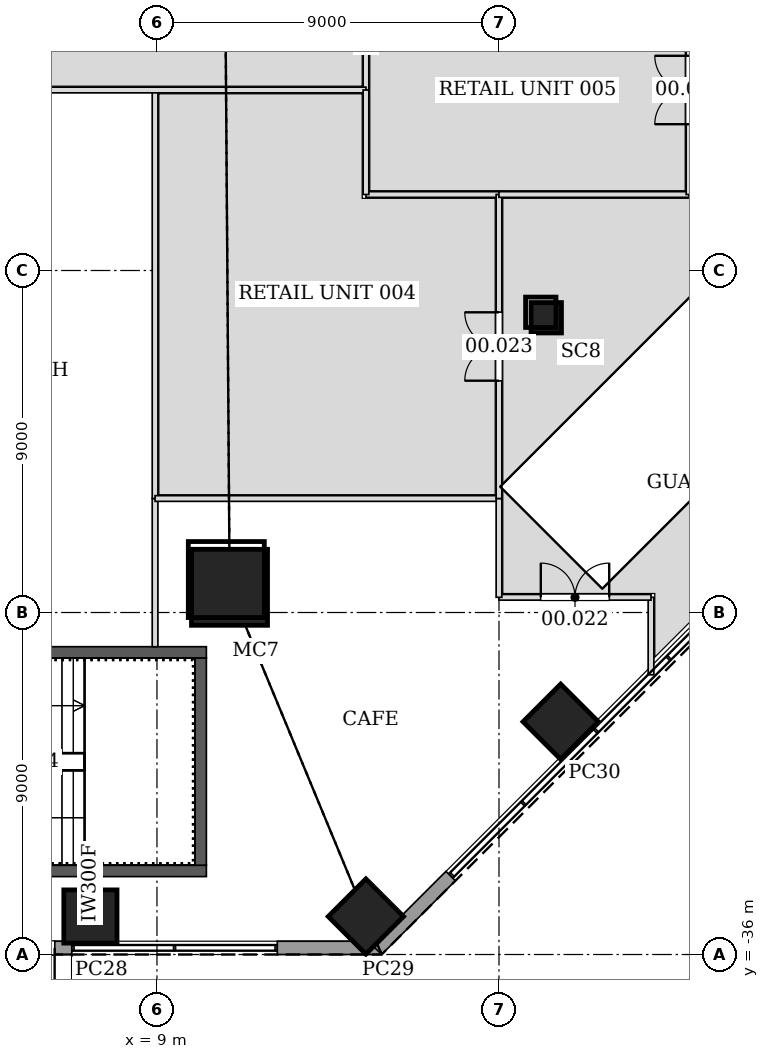
"""IFC4 building model, lengths in metres.
Left out: names, types, materials, properties, quantities, classifications, styles, units other than length and angle.
Written with IfcOpenShell. Run it as: python <this file> out.ifc"""

import sys

from ifc_helpers import new_model, si_unit, direction, frame, frame_2d, origin, origin_2d, place, context, subcontext, project, spatial, rectangle, hollow_rectangle, extrude, element, fill, save


model = new_model("IFC4")
c1 = context("Model", 3, precision=1e-05, world=origin(), true_north=direction((0.0, 1.0)))
c2 = subcontext(c1, "Body", "Model", "MODEL_VIEW")
j1 = project(units=[si_unit("LENGTHUNIT", "METRE"), si_unit("PLANEANGLEUNIT", "RADIAN")], contexts=[c1])
p1 = place(None, origin())
s1 = spatial("IfcSite", under=j1, at=p1, CompositionType="ELEMENT")
p2 = place(p1, origin())
s2 = spatial("IfcBuilding", under=s1, at=p2, CompositionType="ELEMENT")
p3 = place(p2, origin())
s3 = spatial("IfcBuildingStorey", under=s2, at=p3, CompositionType="ELEMENT", Elevation=0.0)
p4 = place(p3, frame((10.909, -26.336, 0.0), z_axis=(-0.011726897842, 0.028266568786, 0.999531630793), x_axis=(-0.923665637433, -0.383199413132, 0.0)))
e1 = element("IfcColumn", 1, at=p4, inside=s3, PredefinedType="COLUMN", context=c2, shape_type="SweptSolid", body=[
    extrude(hollow_rectangle(XDim=2.0, YDim=2.0, WallThickness=0.09, at=origin_2d()), origin(), (0.0, 0.0, 1.0), 7.203),
])
p5 = place(p3, frame((19.244, -19.244, 0.0), z_axis=(-0.019998101035, 0.019998101035, 0.999599995953), x_axis=(-0.707106781187, -0.707106781187, 0.0)))
e2 = element("IfcColumn", 2, at=p5, inside=s3, PredefinedType="COLUMN", context=c2, shape_type="SweptSolid", body=[
    extrude(hollow_rectangle(XDim=0.8, YDim=0.8, WallThickness=0.05, at=origin_2d()), origin(), (0.0, 0.0, 1.0), 7.203),
])
for number, where, z_axis, x_axis in (
    (3, (7.249, -35.0, 0.0), (0.0, 0.0, 1.0), (1.0, 0.0, 0.0)),
    (4, (14.498, -35.0, 0.0), (0.0, 0.0, 1.0), (0.707, 0.707, 0.0)),
    (5, (19.623, -29.874, 0.0), (0.0, 0.0, 1.0), (0.707, 0.707, 0.0)),
):
    element("IfcColumn", number, at=place(p3, frame(where, z_axis=z_axis, x_axis=x_axis)), inside=s3, PredefinedType="COLUMN", context=c2, shape_type="SweptSolid", body=[
        extrude(rectangle(XDim=1.4, YDim=1.4, at=origin_2d()), origin(), (0.0, 0.0, 1.0), 7.2),
    ])
p6 = place(p3, frame((0.1, -33.8, 0.0), z_axis=(0.0, 0.0, 1.0), x_axis=(1.0, 0.0, 0.0)))
e6 = element("IfcWall", 6, at=p6, inside=s3, PredefinedType="SOLIDWALL", context=c2, shape_type="SweptSolid", body=[
    extrude(rectangle(XDim=10.2, YDim=0.3, at=frame_2d((5.1, 0.0))), origin(), (0.0, 0.0, 1.0), 7.2),
])
p7 = place(p6, frame((1.05, 0.0, 0.0)))
e7 = element("IfcOpeningElement", 7, at=p7, cuts=e6, PredefinedType="OPENING", context=c2, shape_type="SweptSolid", body=[
    extrude(rectangle(XDim=1.0, YDim=2.1, at=frame_2d((0.5, 1.05))), frame((0.0, 0.16, 0.0), z_axis=(0.0, -1.0, 0.0), x_axis=(1.0, 0.0, 0.0)), (0.0, 0.0, 1.0), 0.32),
])
p8 = place(p3, frame((10.3, -28.05, 0.0), z_axis=(0.0, 0.0, 1.0), x_axis=(-1.0, 0.0, 0.0)))
e8 = element("IfcWall", 8, at=p8, inside=s3, PredefinedType="SOLIDWALL", context=c2, shape_type="SweptSolid", body=[
    extrude(rectangle(XDim=10.2, YDim=0.3, at=frame_2d((5.1, 0.0))), origin(), (0.0, 0.0, 1.0), 7.2),
])
p9 = place(p3, frame((10.15, -33.65, 0.0), z_axis=(0.0, 0.0, 1.0), x_axis=(0.0, 1.0, 0.0)))
e9 = element("IfcWall", 9, at=p9, inside=s3, PredefinedType="SOLIDWALL", context=c2, shape_type="SweptSolid", body=[
    extrude(rectangle(XDim=5.45, YDim=0.3, at=frame_2d((2.725, 0.0))), origin(), (0.0, 0.0, 1.0), 7.2),
])
p10 = place(p3, frame((4.055, -35.825, 0.0), z_axis=(0.0, 0.0, 1.0), x_axis=(1.0, 0.0, 0.0)))
e10 = element("IfcWall", 10, at=p10, inside=s3, PredefinedType="SOLIDWALL", context=c2, shape_type="SweptSolid", body=[
    extrude(rectangle(XDim=2.704, YDim=0.35, at=frame_2d((1.352, 0.0))), origin(), (0.0, 0.0, 1.0), 6.9),
])
p11 = place(p10, frame((0.452, 0.0, 0.0)))
e11 = element("IfcOpeningElement", 11, at=p11, cuts=e10, PredefinedType="OPENING", context=c2, shape_type="SweptSolid", body=[
    extrude(rectangle(XDim=1.8, YDim=2.4, at=frame_2d((0.9, 1.2))), frame((0.0, 0.185, 0.0), z_axis=(0.0, -1.0, 0.0), x_axis=(1.0, 0.0, 0.0)), (0.0, 0.0, 1.0), 0.37),
])
for number, where, z_axis, x_axis in (
    (12, (12.167, -35.825, 0.0), (0.0, 0.0, 1.0), (1.0, 0.0, 0.0)),
    (13, (14.788, -35.876, 0.0), (0.0, 0.0, 1.0), (0.707, 0.707, 0.0)),
):
    element("IfcWall", number, at=place(p3, frame(where, z_axis=z_axis, x_axis=x_axis)), inside=s3, PredefinedType="SOLIDWALL", context=c2, shape_type="SweptSolid", body=[
        extrude(rectangle(XDim=2.745, YDim=0.35, at=frame_2d((1.373, 0.0))), origin(), (0.0, 0.0, 1.0), 6.9),
    ])
p12 = place(p3, frame((7.249, -34.281, 0.0), z_axis=(0.0, 0.0, 1.0), x_axis=(0.0, 1.0, 0.0)))
e14 = element("IfcWall", 14, at=p12, inside=s3, PredefinedType="PARTITIONING", context=c2, shape_type="SweptSolid", body=[
    extrude(rectangle(XDim=0.332, YDim=0.3, at=frame_2d((0.166, 0.0))), origin(), (0.0, 0.0, 1.0), 6.291),
])
p13 = place(p3, frame((14.5, -8.0, 0.0), z_axis=(0.0, 0.0, 1.0), x_axis=(0.0, -1.0, 0.0)))
e15 = element("IfcWall", 15, at=p13, inside=s3, PredefinedType="PARTITIONING", context=c2, shape_type="SweptSolid", body=[
    extrude(rectangle(XDim=5.251, YDim=0.15, at=frame_2d((2.625, 0.0))), origin(), (0.0, 0.0, 1.0), 5.59),
])
p14 = place(p13, frame((0.8, 0.0, 0.0)))
e16 = element("IfcOpeningElement", 16, at=p14, cuts=e15, PredefinedType="OPENING", context=c2, shape_type="SweptSolid", body=[
    extrude(rectangle(XDim=0.9, YDim=2.1, at=frame_2d((0.45, 1.05))), frame((0.0, 0.085, 0.0), z_axis=(0.0, -1.0, 0.0), x_axis=(1.0, 0.0, 0.0)), (0.0, 0.0, 1.0), 0.17),
])
p15 = place(p3, frame((8.95, -27.9, 0.0), z_axis=(0.0, 0.0, 1.0), x_axis=(0.0, 1.0, 0.0)))
e17 = element("IfcWall", 17, at=p15, inside=s3, PredefinedType="PARTITIONING", context=c2, shape_type="SweptSolid", body=[
    extrude(rectangle(XDim=3.901, YDim=0.15, at=frame_2d((1.951, 0.0))), origin(), (0.0, 0.0, 1.0), 5.879),
])
p16 = place(p3, frame((8.95, -24.001, 0.0), z_axis=(0.0, 0.0, 1.0), x_axis=(0.0, 1.0, 0.0)))
e18 = element("IfcWall", 18, at=p16, inside=s3, PredefinedType="PARTITIONING", context=c2, shape_type="SweptSolid", body=[
    extrude(rectangle(XDim=10.751, YDim=0.15, at=frame_2d((5.375, 0.0))), origin(), (0.0, 0.0, 1.0), 6.044),
])
p17 = place(p3, frame((0.25, -13.25, 0.0), z_axis=(0.0, 0.0, 1.0), x_axis=(1.0, 0.0, 0.0)))
e19 = element("IfcWall", 19, at=p17, inside=s3, PredefinedType="PARTITIONING", context=c2, shape_type="SweptSolid", body=[
    extrude(rectangle(XDim=14.25, YDim=0.15, at=frame_2d((7.125, 0.0))), origin(), (0.0, 0.0, 1.0), 5.59),
])
p18 = place(p17, frame((3.45, 0.0, 0.0)))
e20 = element("IfcOpeningElement", 20, at=p18, cuts=e19, PredefinedType="OPENING", context=c2, shape_type="SweptSolid", body=[
    extrude(rectangle(XDim=1.8, YDim=2.4, at=frame_2d((0.9, 1.2))), frame((0.0, 0.085, 0.0), z_axis=(0.0, -1.0, 0.0), x_axis=(1.0, 0.0, 0.0)), (0.0, 0.0, 1.0), 0.17),
])
p19 = place(p3, frame((18.0, -24.0, 0.0), z_axis=(0.0, 0.0, 1.0), x_axis=(-1.0, 0.0, 0.0)))
e21 = element("IfcWall", 21, at=p19, inside=s3, PredefinedType="PARTITIONING", context=c2, shape_type="SweptSolid", body=[
    extrude(rectangle(XDim=9.05, YDim=0.15, at=frame_2d((4.525, 0.0))), origin(), (0.0, 0.0, 1.0), 5.59),
])
p20 = place(p3, frame((22.0, -28.64, 0.0), z_axis=(0.0, 0.0, 1.0), x_axis=(0.0, 1.0, 0.0)))
e22 = element("IfcWall", 22, at=p20, inside=s3, PredefinedType="PARTITIONING", context=c2, shape_type="SweptSolid", body=[
    extrude(rectangle(XDim=2.04, YDim=0.15, at=frame_2d((1.02, 0.0))), origin(), (0.0, 0.0, 1.0), 6.291),
])
p21 = place(p3, frame((22.0, -26.6, 0.0), z_axis=(0.0, 0.0, 1.0), x_axis=(-1.0, 0.0, 0.0)))
e23 = element("IfcWall", 23, at=p21, inside=s3, PredefinedType="PARTITIONING", context=c2, shape_type="SweptSolid", body=[
    extrude(rectangle(XDim=4.0, YDim=0.15, at=frame_2d((2.0, 0.0))), origin(), (0.0, 0.0, 1.0), 6.364),
])
p22 = place(p21, frame((1.1, 0.0, 0.0)))
e24 = element("IfcOpeningElement", 24, at=p22, cuts=e23, PredefinedType="OPENING", context=c2, shape_type="SweptSolid", body=[
    extrude(rectangle(XDim=1.8, YDim=2.4, at=frame_2d((0.9, 1.2))), frame((0.0, 0.085, 0.0), z_axis=(0.0, -1.0, 0.0), x_axis=(1.0, 0.0, 0.0)), (0.0, 0.0, 1.0), 0.17),
])
p23 = place(p3, frame((18.0, -26.6, 0.0), z_axis=(0.0, 0.0, 1.0), x_axis=(0.0, 1.0, 0.0)))
e25 = element("IfcWall", 25, at=p23, inside=s3, PredefinedType="PARTITIONING", context=c2, shape_type="SweptSolid", body=[
    extrude(rectangle(XDim=2.6, YDim=0.15, at=frame_2d((1.3, 0.0))), origin(), (0.0, 0.0, 1.0), 6.9),
])
p24 = place(p3, frame((18.0, -16.0, 0.0), z_axis=(0.0, 0.0, 1.0), x_axis=(-1.0, 0.0, 0.0)))
e26 = element("IfcWall", 26, at=p24, inside=s3, PredefinedType="PARTITIONING", context=c2, shape_type="SweptSolid", body=[
    extrude(rectangle(XDim=3.5, YDim=0.15, at=frame_2d((1.75, 0.0))), origin(), (0.0, 0.0, 1.0), 5.79),
])
p25 = place(p3, frame((14.5, -16.0, 0.0), z_axis=(0.0, 0.0, 1.0), x_axis=(0.0, 1.0, 0.0)))
e27 = element("IfcWall", 27, at=p25, inside=s3, PredefinedType="PARTITIONING", context=c2, shape_type="SweptSolid", body=[
    extrude(rectangle(XDim=2.75, YDim=0.15, at=frame_2d((1.375, 0.0))), origin(), (0.0, 0.0, 1.0), 5.79),
])
p26 = place(p3, frame((18.0, -24.0, 0.0), z_axis=(0.0, 0.0, 1.0), x_axis=(0.0, 1.0, 0.0)))
e28 = element("IfcWall", 28, at=p26, inside=s3, PredefinedType="PARTITIONING", context=c2, shape_type="SweptSolid", body=[
    extrude(rectangle(XDim=8.0, YDim=0.15, at=frame_2d((4.0, 0.0))), origin(), (0.0, 0.0, 1.0), 5.79),
])
p27 = place(p26, frame((3.1, 0.0, 0.0)))
e29 = element("IfcOpeningElement", 29, at=p27, cuts=e28, PredefinedType="OPENING", context=c2, shape_type="SweptSolid", body=[
    extrude(rectangle(XDim=1.8, YDim=2.4, at=frame_2d((0.9, 1.2))), frame((0.0, 0.085, 0.0), z_axis=(0.0, -1.0, 0.0), x_axis=(1.0, 0.0, 0.0)), (0.0, 0.0, 1.0), 0.17),
])
p28 = place(p3, frame((17.999, -16.0, 0.0), z_axis=(0.0, 0.0, 1.0), x_axis=(1.0, 0.0, 0.0)))
e30 = element("IfcWall", 30, at=p28, inside=s3, PredefinedType="PARTITIONING", context=c2, shape_type="SweptSolid", body=[
    extrude(rectangle(XDim=5.001, YDim=0.15, at=frame_2d((2.5, 0.0))), origin(), (0.0, 0.0, 1.0), 6.049),
])
p29 = place(p3, frame((23.0, -16.0, 0.0), z_axis=(0.0, 0.0, 1.0), x_axis=(0.0, 1.0, 0.0)))
e31 = element("IfcWall", 31, at=p29, inside=s3, PredefinedType="PARTITIONING", context=c2, shape_type="SweptSolid", body=[
    extrude(rectangle(XDim=5.5, YDim=0.15, at=frame_2d((2.75, 0.0))), origin(), (0.0, 0.0, 1.0), 5.59),
])
p30 = place(p29, frame((1.85, 0.0, 0.0)))
e32 = element("IfcOpeningElement", 32, at=p30, cuts=e31, PredefinedType="OPENING", context=c2, shape_type="SweptSolid", body=[
    extrude(rectangle(XDim=1.8, YDim=2.4, at=frame_2d((0.9, 1.2))), frame((0.0, 0.085, 0.0), z_axis=(0.0, -1.0, 0.0), x_axis=(1.0, 0.0, 0.0)), (0.0, 0.0, 1.0), 0.17),
])
p31 = place(p11, frame((1.8, 0.0, 0.0), z_axis=(0.0, 0.0, 1.0), x_axis=(-1.0, 0.0, 0.0)))
e33 = element("IfcDoor", 33, at=p31, inside=s3, OperationType="DOUBLE_DOOR_SINGLE_SWING", PredefinedType="DOOR", context=c2, shape_type="SweptSolid", body=[
    extrude(rectangle(XDim=1.8, YDim=2.4, at=frame_2d((0.9, 1.2))), frame((0.0, 0.025, 0.0), z_axis=(0.0, -1.0, 0.0), x_axis=(1.0, 0.0, 0.0)), (0.0, 0.0, 1.0), 0.05),
])
fill(e11, e33)
p32 = place(p22, frame((1.8, 0.0, 0.0), z_axis=(0.0, 0.0, 1.0), x_axis=(-1.0, 0.0, 0.0)))
e34 = element("IfcDoor", 34, at=p32, inside=s3, OperationType="DOUBLE_DOOR_SINGLE_SWING", PredefinedType="DOOR", context=c2, shape_type="SweptSolid", body=[
    extrude(rectangle(XDim=1.8, YDim=2.4, at=frame_2d((0.9, 1.2))), frame((0.0, 0.025, 0.0), z_axis=(0.0, -1.0, 0.0), x_axis=(1.0, 0.0, 0.0)), (0.0, 0.0, 1.0), 0.05),
])
fill(e24, e34)
p33 = place(p27, origin())
e35 = element("IfcDoor", 35, at=p33, inside=s3, OperationType="DOUBLE_DOOR_SINGLE_SWING", PredefinedType="DOOR", context=c2, shape_type="SweptSolid", body=[
    extrude(rectangle(XDim=1.8, YDim=2.4, at=frame_2d((0.9, 1.2))), frame((0.0, 0.025, 0.0), z_axis=(0.0, -1.0, 0.0), x_axis=(1.0, 0.0, 0.0)), (0.0, 0.0, 1.0), 0.05),
])
fill(e29, e35)
p34 = place(p30, origin())
e36 = element("IfcDoor", 36, at=p34, inside=s3, OperationType="DOUBLE_DOOR_SINGLE_SWING", PredefinedType="DOOR", context=c2, shape_type="SweptSolid", body=[
    extrude(rectangle(XDim=1.8, YDim=2.4, at=frame_2d((0.9, 1.2))), frame((0.0, 0.025, 0.0), z_axis=(0.0, -1.0, 0.0), x_axis=(1.0, 0.0, 0.0)), (0.0, 0.0, 1.0), 0.05),
])
fill(e32, e36)
save(model, sys.argv[1])
